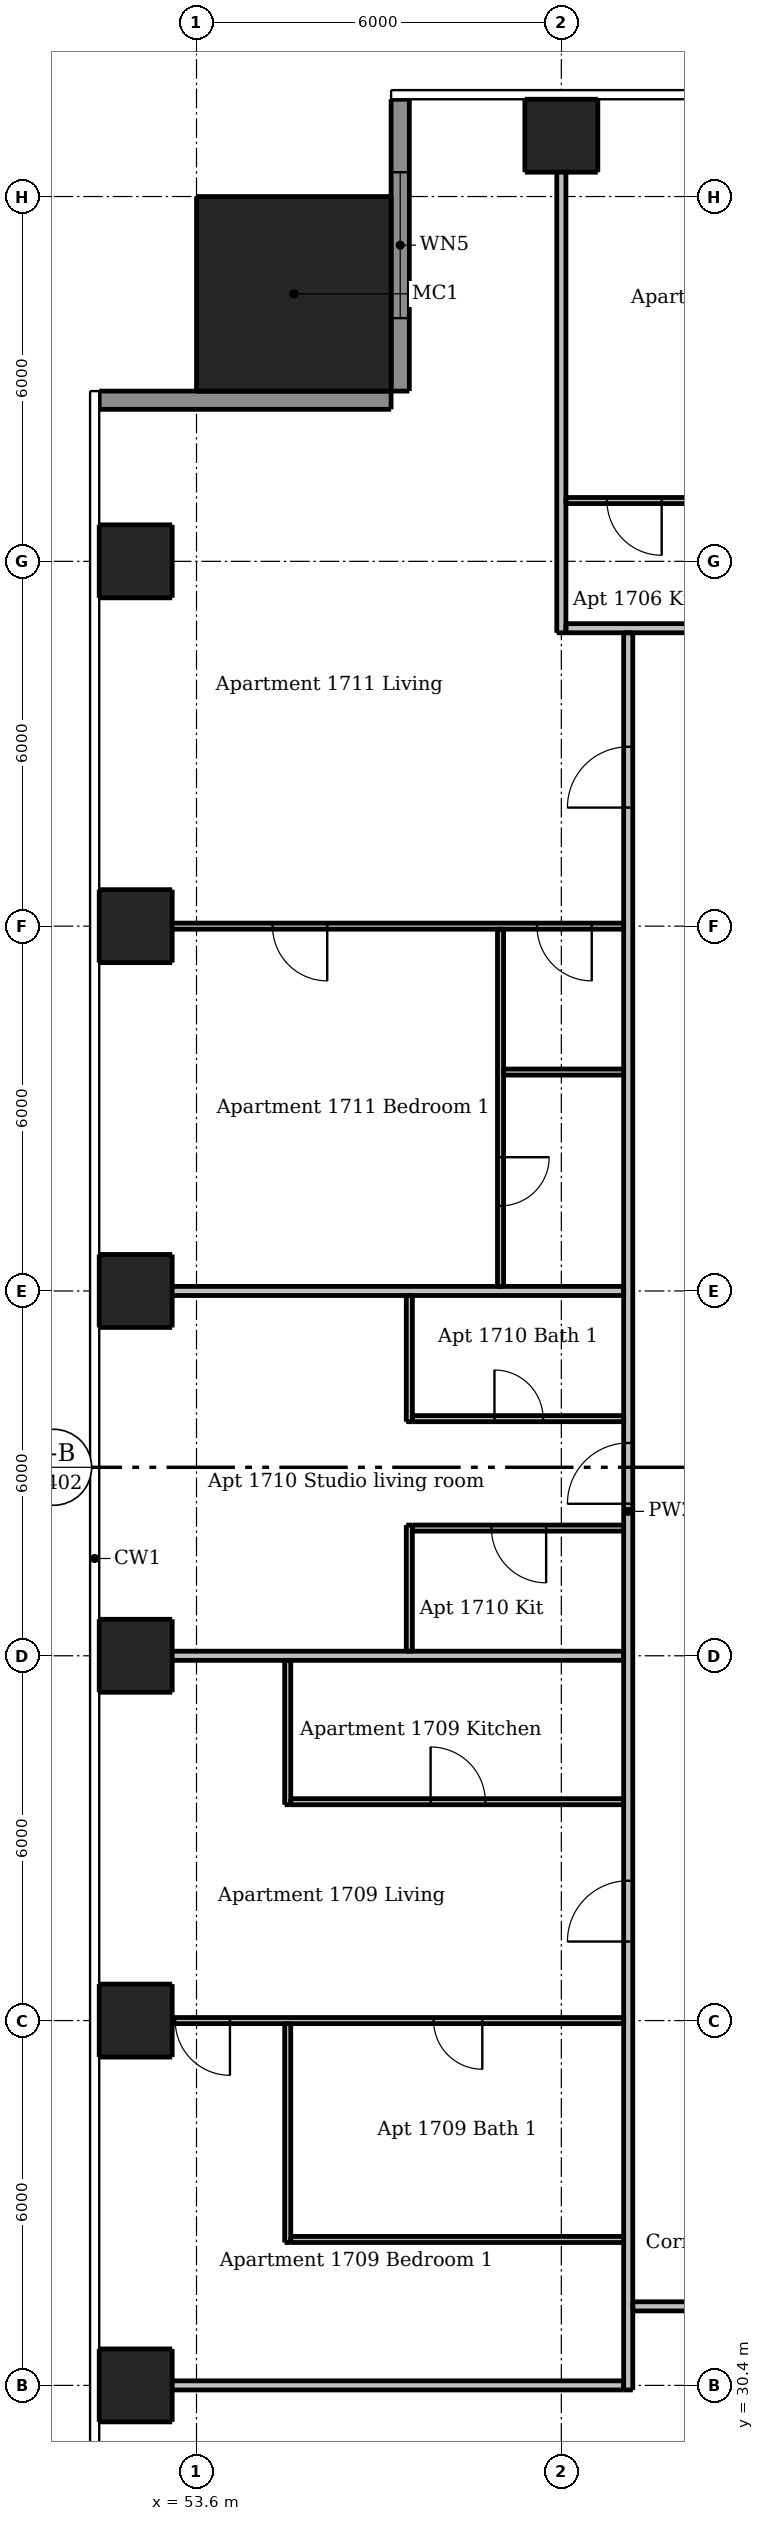
"""IFC4 building model, lengths in metres.
Left out: names, types, materials, properties, quantities, classifications, styles, units other than length and angle.
Written with IfcOpenShell. Run it as: python <this file> out.ifc"""

import sys

from ifc_helpers import new_model, si_unit, direction, frame, frame_2d, origin, origin_2d, place, context, subcontext, project, spatial, rectangle, extrude, element, fill, save


model = new_model("IFC4")
c1 = context("Model", 3, precision=1e-05, world=origin(), true_north=direction((0.0, 1.0)))
c2 = subcontext(c1, "Body", "Model", "MODEL_VIEW")
j1 = project(units=[si_unit("LENGTHUNIT", "METRE"), si_unit("PLANEANGLEUNIT", "RADIAN")], contexts=[c1])
p1 = place(None, origin())
s1 = spatial("IfcSite", under=j1, at=p1, CompositionType="ELEMENT")
p2 = place(p1, origin())
s2 = spatial("IfcBuilding", under=s1, at=p2, CompositionType="ELEMENT")
p3 = place(p2, frame((0.0, 0.0, 63.1)))
s3 = spatial("IfcBuildingStorey", under=s2, at=p3, CompositionType="ELEMENT", Elevation=63.1)
for number, where, z_axis, x_axis in (
    (1, (59.6, 67.4, 0.0), (0.0, 0.0, 1.0), (1.0, 0.0, 0.0)),
    (2, (52.6, 30.4, 0.0), (0.0, 0.0, 1.0), (1.0, 0.0, 0.0)),
    (3, (52.6, 36.4, 0.0), (0.0, 0.0, 1.0), (1.0, 0.0, 0.0)),
    (4, (52.6, 42.4, 0.0), (0.0, 0.0, 1.0), (1.0, 0.0, 0.0)),
    (5, (52.6, 48.4, 0.0), (0.0, 0.0, 1.0), (1.0, 0.0, 0.0)),
    (6, (52.6, 54.4, 0.0), (0.0, 0.0, 1.0), (1.0, 0.0, 0.0)),
    (7, (52.6, 60.4, 0.0), (0.0, 0.0, 1.0), (1.0, 0.0, 0.0)),
):
    element("IfcColumn", number, at=place(p3, frame(where, z_axis=z_axis, x_axis=x_axis)), inside=s3, PredefinedType="COLUMN", context=c2, shape_type="SweptSolid", body=[
        extrude(rectangle(XDim=1.2, YDim=1.2, at=origin_2d()), origin(), (0.0, 0.0, 1.0), 3.05),
    ])
p4 = place(p3, frame((55.2, 64.8, 0.0), z_axis=(0.0, 0.0, 1.0), x_axis=(1.0, 0.0, 0.0)))
e8 = element("IfcColumn", 8, at=p4, inside=s3, PredefinedType="COLUMN", context=c2, shape_type="SweptSolid", body=[
    extrude(rectangle(XDim=3.2, YDim=3.2, at=origin_2d()), origin(), (0.0, 0.0, 1.0), 3.3),
])
p5 = place(p3, frame((56.95, 68.0, 0.0), z_axis=(0.0, 0.0, 1.0), x_axis=(0.0, -1.0, 0.0)))
e9 = element("IfcWall", 9, at=p5, inside=s3, PredefinedType="SOLIDWALL", context=c2, shape_type="SweptSolid", body=[
    extrude(rectangle(XDim=4.8, YDim=0.3, at=frame_2d((2.4, 0.0))), origin(), (0.0, 0.0, 1.0), 3.05),
])
p6 = place(p5, frame((1.2, 0.0, 0.15)))
e10 = element("IfcOpeningElement", 10, at=p6, cuts=e9, PredefinedType="OPENING", context=c2, shape_type="SweptSolid", body=[
    extrude(rectangle(XDim=2.4, YDim=2.1, at=frame_2d((1.2, 1.05))), frame((0.0, 0.16, 0.0), z_axis=(0.0, -1.0, 0.0), x_axis=(1.0, 0.0, 0.0)), (0.0, 0.0, 1.0), 0.32),
])
p7 = place(p3, frame((56.8, 63.05, 0.0), z_axis=(0.0, 0.0, 1.0), x_axis=(-1.0, 0.0, 0.0)))
e11 = element("IfcWall", 11, at=p7, inside=s3, PredefinedType="SOLIDWALL", context=c2, shape_type="SweptSolid", body=[
    extrude(rectangle(XDim=4.8, YDim=0.3, at=frame_2d((2.4, 0.0))), origin(), (0.0, 0.0, 1.0), 3.05),
])
p8 = place(p3, frame((55.1, 32.75, 0.0), z_axis=(0.0, 0.0, 1.0), x_axis=(0.0, 1.0, 0.0)))
e12 = element("IfcWall", 12, at=p8, inside=s3, PredefinedType="PARTITIONING", context=c2, shape_type="SweptSolid", body=[
    extrude(rectangle(XDim=3.6, YDim=0.1, at=frame_2d((1.8, 0.0))), origin(), (0.0, 0.0, 1.0), 3.05),
])
p9 = place(p3, frame((55.1, 39.95, 0.0), z_axis=(0.0, 0.0, 1.0), x_axis=(0.0, 1.0, 0.0)))
e13 = element("IfcWall", 13, at=p9, inside=s3, PredefinedType="PARTITIONING", context=c2, shape_type="SweptSolid", body=[
    extrude(rectangle(XDim=2.375, YDim=0.1, at=frame_2d((1.188, 0.0))), origin(), (0.0, 0.0, 1.0), 3.05),
])
for number, where, z_axis, x_axis in (
    (14, (57.1, 42.475, 0.0), (0.0, 0.0, 1.0), (0.0, 1.0, 0.0)),
    (15, (57.1, 46.25, 0.0), (0.0, 0.0, 1.0), (0.0, 1.0, 0.0)),
):
    element("IfcWall", number, at=place(p3, frame(where, z_axis=z_axis, x_axis=x_axis)), inside=s3, PredefinedType="PARTITIONING", context=c2, shape_type="SweptSolid", body=[
        extrude(rectangle(XDim=2.075, YDim=0.1, at=frame_2d((1.038, 0.0))), origin(), (0.0, 0.0, 1.0), 3.05),
    ])
p10 = place(p3, frame((58.6, 54.35, 0.0), z_axis=(0.0, 0.0, 1.0), x_axis=(0.0, -1.0, 0.0)))
e16 = element("IfcWall", 16, at=p10, inside=s3, PredefinedType="PARTITIONING", context=c2, shape_type="SweptSolid", body=[
    extrude(rectangle(XDim=5.875, YDim=0.1, at=frame_2d((2.938, 0.0))), origin(), (0.0, 0.0, 1.0), 3.05),
])
p11 = place(p10, frame((3.75, 0.0, 0.0)))
e17 = element("IfcOpeningElement", 17, at=p11, cuts=e16, PredefinedType="OPENING", context=c2, shape_type="SweptSolid", body=[
    extrude(rectangle(XDim=0.8, YDim=2.1, at=frame_2d((0.4, 1.05))), frame((0.0, 0.06, 0.0), z_axis=(0.0, -1.0, 0.0), x_axis=(1.0, 0.0, 0.0)), (0.0, 0.0, 1.0), 0.12),
])
p12 = place(p3, frame((61.95, 61.4, 0.0), z_axis=(0.0, 0.0, 1.0), x_axis=(-1.0, 0.0, 0.0)))
e18 = element("IfcWall", 18, at=p12, inside=s3, PredefinedType="PARTITIONING", context=c2, shape_type="SweptSolid", body=[
    extrude(rectangle(XDim=2.275, YDim=0.1, at=frame_2d((1.137, 0.0))), origin(), (0.0, 0.0, 1.0), 3.05),
])
p13 = place(p12, frame((0.7, 0.0, 0.0)))
e19 = element("IfcOpeningElement", 19, at=p13, cuts=e18, PredefinedType="OPENING", context=c2, shape_type="SweptSolid", body=[
    extrude(rectangle(XDim=0.9, YDim=2.1, at=frame_2d((0.45, 1.05))), frame((0.0, 0.06, 0.0), z_axis=(0.0, -1.0, 0.0), x_axis=(1.0, 0.0, 0.0)), (0.0, 0.0, 1.0), 0.12),
])
p14 = place(p3, frame((60.625, 54.4, 0.0), z_axis=(0.0, 0.0, 1.0), x_axis=(-1.0, 0.0, 0.0)))
e20 = element("IfcWall", 20, at=p14, inside=s3, PredefinedType="PARTITIONING", context=c2, shape_type="SweptSolid", body=[
    extrude(rectangle(XDim=8.625, YDim=0.1, at=frame_2d((4.312, 0.0))), origin(), (0.0, 0.0, 1.0), 2.516),
])
p15 = place(p14, frame((0.525, 0.0, 0.0)))
e21 = element("IfcOpeningElement", 21, at=p15, cuts=e20, PredefinedType="OPENING", context=c2, shape_type="SweptSolid", body=[
    extrude(rectangle(XDim=0.9, YDim=2.1, at=frame_2d((0.45, 1.05))), frame((0.0, 0.06, 0.0), z_axis=(0.0, -1.0, 0.0), x_axis=(1.0, 0.0, 0.0)), (0.0, 0.0, 1.0), 0.12),
])
p16 = place(p14, frame((4.875, 0.0, 0.0)))
e22 = element("IfcOpeningElement", 22, at=p16, cuts=e20, PredefinedType="OPENING", context=c2, shape_type="SweptSolid", body=[
    extrude(rectangle(XDim=0.9, YDim=2.1, at=frame_2d((0.45, 1.05))), frame((0.0, 0.06, 0.0), z_axis=(0.0, -1.0, 0.0), x_axis=(1.0, 0.0, 0.0)), (0.0, 0.0, 1.0), 0.12),
])
p17 = place(p3, frame((58.65, 52.0, 0.0), z_axis=(0.0, 0.0, 1.0), x_axis=(1.0, 0.0, 0.0)))
e23 = element("IfcWall", 23, at=p17, inside=s3, PredefinedType="PARTITIONING", context=c2, shape_type="SweptSolid", body=[
    extrude(rectangle(XDim=1.975, YDim=0.1, at=frame_2d((0.988, 0.0))), origin(), (0.0, 0.0, 1.0), 3.05),
])
p18 = place(p3, frame((57.15, 46.3, 0.0), z_axis=(0.0, 0.0, 1.0), x_axis=(1.0, 0.0, 0.0)))
e24 = element("IfcWall", 24, at=p18, inside=s3, PredefinedType="PARTITIONING", context=c2, shape_type="SweptSolid", body=[
    extrude(rectangle(XDim=3.475, YDim=0.1, at=frame_2d((1.738, 0.0))), origin(), (0.0, 0.0, 1.0), 3.05),
])
p19 = place(p18, frame((1.35, 0.0, 0.0)))
e25 = element("IfcOpeningElement", 25, at=p19, cuts=e24, PredefinedType="OPENING", context=c2, shape_type="SweptSolid", body=[
    extrude(rectangle(XDim=0.8, YDim=2.1, at=frame_2d((0.4, 1.05))), frame((0.0, 0.06, 0.0), z_axis=(0.0, -1.0, 0.0), x_axis=(1.0, 0.0, 0.0)), (0.0, 0.0, 1.0), 0.12),
])
p20 = place(p3, frame((60.625, 44.5, 0.0), z_axis=(0.0, 0.0, 1.0), x_axis=(-1.0, 0.0, 0.0)))
e26 = element("IfcWall", 26, at=p20, inside=s3, PredefinedType="PARTITIONING", context=c2, shape_type="SweptSolid", body=[
    extrude(rectangle(XDim=3.475, YDim=0.1, at=frame_2d((1.738, 0.0))), origin(), (0.0, 0.0, 1.0), 3.05),
])
p21 = place(p20, frame((1.275, 0.0, 0.0)))
e27 = element("IfcOpeningElement", 27, at=p21, cuts=e26, PredefinedType="OPENING", context=c2, shape_type="SweptSolid", body=[
    extrude(rectangle(XDim=0.9, YDim=2.1, at=frame_2d((0.45, 1.05))), frame((0.0, 0.06, 0.0), z_axis=(0.0, -1.0, 0.0), x_axis=(1.0, 0.0, 0.0)), (0.0, 0.0, 1.0), 0.12),
])
p22 = place(p3, frame((55.15, 40.0, 0.0), z_axis=(0.0, 0.0, 1.0), x_axis=(1.0, 0.0, 0.0)))
e28 = element("IfcWall", 28, at=p22, inside=s3, PredefinedType="PARTITIONING", context=c2, shape_type="SweptSolid", body=[
    extrude(rectangle(XDim=5.475, YDim=0.1, at=frame_2d((2.738, 0.0))), origin(), (0.0, 0.0, 1.0), 3.05),
])
p23 = place(p22, frame((2.3, 0.0, 0.0)))
e29 = element("IfcOpeningElement", 29, at=p23, cuts=e28, PredefinedType="OPENING", context=c2, shape_type="SweptSolid", body=[
    extrude(rectangle(XDim=0.9, YDim=2.1, at=frame_2d((0.45, 1.05))), frame((0.0, 0.06, 0.0), z_axis=(0.0, -1.0, 0.0), x_axis=(1.0, 0.0, 0.0)), (0.0, 0.0, 1.0), 0.12),
])
p24 = place(p3, frame((60.625, 36.4, 0.0), z_axis=(0.0, 0.0, 1.0), x_axis=(-1.0, 0.0, 0.0)))
e30 = element("IfcWall", 30, at=p24, inside=s3, PredefinedType="PARTITIONING", context=c2, shape_type="SweptSolid", body=[
    extrude(rectangle(XDim=8.625, YDim=0.1, at=frame_2d((4.312, 0.0))), origin(), (0.0, 0.0, 1.0), 2.516),
])
p25 = place(p24, frame((6.475, 0.0, 0.0)))
e31 = element("IfcOpeningElement", 31, at=p25, cuts=e30, PredefinedType="OPENING", context=c2, shape_type="SweptSolid", body=[
    extrude(rectangle(XDim=0.9, YDim=2.1, at=frame_2d((0.45, 1.05))), frame((0.0, 0.06, 0.0), z_axis=(0.0, -1.0, 0.0), x_axis=(1.0, 0.0, 0.0)), (0.0, 0.0, 1.0), 0.12),
])
p26 = place(p24, frame((2.325, 0.0, 0.0)))
e32 = element("IfcOpeningElement", 32, at=p26, cuts=e30, PredefinedType="OPENING", context=c2, shape_type="SweptSolid", body=[
    extrude(rectangle(XDim=0.8, YDim=2.1, at=frame_2d((0.4, 1.05))), frame((0.0, 0.06, 0.0), z_axis=(0.0, -1.0, 0.0), x_axis=(1.0, 0.0, 0.0)), (0.0, 0.0, 1.0), 0.12),
])
p27 = place(p3, frame((55.15, 32.8, 0.0), z_axis=(0.0, 0.0, 1.0), x_axis=(1.0, 0.0, 0.0)))
e33 = element("IfcWall", 33, at=p27, inside=s3, PredefinedType="PARTITIONING", context=c2, shape_type="SweptSolid", body=[
    extrude(rectangle(XDim=5.475, YDim=0.1, at=frame_2d((2.738, 0.0))), origin(), (0.0, 0.0, 1.0), 3.05),
])
p28 = place(p3, frame((59.6, 59.225, 0.0), z_axis=(0.0, 0.0, 1.0), x_axis=(0.0, 1.0, 0.0)))
e34 = element("IfcWall", 34, at=p28, inside=s3, PredefinedType="PARTITIONING", context=c2, shape_type="SweptSolid", body=[
    extrude(rectangle(XDim=8.775, YDim=0.15, at=frame_2d((4.387, 0.0))), origin(), (0.0, 0.0, 1.0), 2.51),
])
p29 = place(p3, frame((60.7, 30.325, 0.0), z_axis=(0.0, 0.0, 1.0), x_axis=(0.0, 1.0, 0.0)))
e35 = element("IfcWall", 35, at=p29, inside=s3, PredefinedType="PARTITIONING", context=c2, shape_type="SweptSolid", body=[
    extrude(rectangle(XDim=28.9, YDim=0.15, at=frame_2d((14.45, 0.0))), origin(), (0.0, 0.0, 1.0), 3.05),
])
p30 = place(p29, frame((7.375, 0.0, 0.0)))
e36 = element("IfcOpeningElement", 36, at=p30, cuts=e35, PredefinedType="OPENING", context=c2, shape_type="SweptSolid", body=[
    extrude(rectangle(XDim=1.0, YDim=2.1, at=frame_2d((0.5, 1.05))), frame((0.0, 0.085, 0.0), z_axis=(0.0, -1.0, 0.0), x_axis=(1.0, 0.0, 0.0)), (0.0, 0.0, 1.0), 0.17),
])
p31 = place(p29, frame((14.575, 0.0, 0.0)))
e37 = element("IfcOpeningElement", 37, at=p31, cuts=e35, PredefinedType="OPENING", context=c2, shape_type="SweptSolid", body=[
    extrude(rectangle(XDim=1.0, YDim=2.1, at=frame_2d((0.5, 1.05))), frame((0.0, 0.085, 0.0), z_axis=(0.0, -1.0, 0.0), x_axis=(1.0, 0.0, 0.0)), (0.0, 0.0, 1.0), 0.17),
])
p32 = place(p29, frame((26.025, 0.0, 0.0)))
e38 = element("IfcOpeningElement", 38, at=p32, cuts=e35, PredefinedType="OPENING", context=c2, shape_type="SweptSolid", body=[
    extrude(rectangle(XDim=1.0, YDim=2.1, at=frame_2d((0.5, 1.05))), frame((0.0, 0.085, 0.0), z_axis=(0.0, -1.0, 0.0), x_axis=(1.0, 0.0, 0.0)), (0.0, 0.0, 1.0), 0.17),
])
p33 = place(p3, frame((59.675, 59.3, 0.0), z_axis=(0.0, 0.0, 1.0), x_axis=(1.0, 0.0, 0.0)))
e39 = element("IfcWall", 39, at=p33, inside=s3, PredefinedType="PARTITIONING", context=c2, shape_type="SweptSolid", body=[
    extrude(rectangle(XDim=28.55, YDim=0.15, at=frame_2d((14.275, 0.0))), origin(), (0.0, 0.0, 1.0), 3.05),
])
p34 = place(p33, frame((3.625, 0.0, 0.0)))
e40 = element("IfcOpeningElement", 40, at=p34, cuts=e39, PredefinedType="OPENING", context=c2, shape_type="SweptSolid", body=[
    extrude(rectangle(XDim=1.0, YDim=2.1, at=frame_2d((0.5, 1.05))), frame((0.0, 0.085, 0.0), z_axis=(0.0, -1.0, 0.0), x_axis=(1.0, 0.0, 0.0)), (0.0, 0.0, 1.0), 0.17),
])
p35 = place(p33, frame((14.425, 0.0, 0.0)))
e41 = element("IfcOpeningElement", 41, at=p35, cuts=e39, PredefinedType="OPENING", context=c2, shape_type="SweptSolid", body=[
    extrude(rectangle(XDim=1.0, YDim=2.1, at=frame_2d((0.5, 1.05))), frame((0.0, 0.085, 0.0), z_axis=(0.0, -1.0, 0.0), x_axis=(1.0, 0.0, 0.0)), (0.0, 0.0, 1.0), 0.17),
])
p36 = place(p33, frame((25.775, 0.0, 0.0)))
e42 = element("IfcOpeningElement", 42, at=p36, cuts=e39, PredefinedType="OPENING", context=c2, shape_type="SweptSolid", body=[
    extrude(rectangle(XDim=1.0, YDim=2.1, at=frame_2d((0.5, 1.05))), frame((0.0, 0.085, 0.0), z_axis=(0.0, -1.0, 0.0), x_axis=(1.0, 0.0, 0.0)), (0.0, 0.0, 1.0), 0.17),
])
for number, where, z_axis, x_axis in (
    (43, (52.0, 48.4, 0.0), (0.0, 0.0, 1.0), (1.0, 0.0, 0.0)),
    (44, (52.0, 42.4, 0.0), (0.0, 0.0, 1.0), (1.0, 0.0, 0.0)),
):
    element("IfcWall", number, at=place(p3, frame(where, z_axis=z_axis, x_axis=x_axis)), inside=s3, PredefinedType="PARTITIONING", context=c2, shape_type="SweptSolid", body=[
        extrude(rectangle(XDim=8.625, YDim=0.15, at=frame_2d((4.312, 0.0))), origin(), (0.0, 0.0, 1.0), 2.516),
    ])
p37 = place(p3, frame((89.525, 31.7, 0.0), z_axis=(0.0, 0.0, 1.0), x_axis=(-1.0, 0.0, 0.0)))
e45 = element("IfcWall", 45, at=p37, inside=s3, PredefinedType="PARTITIONING", context=c2, shape_type="SweptSolid", body=[
    extrude(rectangle(XDim=28.75, YDim=0.15, at=frame_2d((14.375, 0.0))), origin(), (0.0, 0.0, 1.0), 3.05),
])
p38 = place(p37, frame((24.625, 0.0, 0.0)))
e46 = element("IfcOpeningElement", 46, at=p38, cuts=e45, PredefinedType="OPENING", context=c2, shape_type="SweptSolid", body=[
    extrude(rectangle(XDim=1.0, YDim=2.1, at=frame_2d((0.5, 1.05))), frame((0.0, 0.085, 0.0), z_axis=(0.0, -1.0, 0.0), x_axis=(1.0, 0.0, 0.0)), (0.0, 0.0, 1.0), 0.17),
])
p39 = place(p37, frame((8.425, 0.0, 0.0)))
e47 = element("IfcOpeningElement", 47, at=p39, cuts=e45, PredefinedType="OPENING", context=c2, shape_type="SweptSolid", body=[
    extrude(rectangle(XDim=1.0, YDim=2.1, at=frame_2d((0.5, 1.05))), frame((0.0, 0.085, 0.0), z_axis=(0.0, -1.0, 0.0), x_axis=(1.0, 0.0, 0.0)), (0.0, 0.0, 1.0), 0.17),
])
p40 = place(p3, frame((52.0, 30.4, 0.0), z_axis=(0.0, 0.0, 1.0), x_axis=(1.0, 0.0, 0.0)))
e48 = element("IfcWall", 48, at=p40, inside=s3, PredefinedType="PARTITIONING", context=c2, shape_type="SweptSolid", body=[
    extrude(rectangle(XDim=8.625, YDim=0.15, at=frame_2d((4.312, 0.0))), origin(), (0.0, 0.0, 1.0), 2.647),
])
p41 = place(p6, origin())
e49 = element("IfcWindow", 49, at=p41, inside=s3, PartitioningType="DOUBLE_PANEL_VERTICAL", PredefinedType="WINDOW", context=c2, shape_type="SweptSolid", body=[
    extrude(rectangle(XDim=2.4, YDim=2.1, at=frame_2d((1.2, 1.05))), frame((0.0, 0.03, 0.0), z_axis=(0.0, -1.0, 0.0), x_axis=(1.0, 0.0, 0.0)), (0.0, 0.0, 1.0), 0.06),
])
fill(e10, e49)
p42 = place(p13, origin())
e50 = element("IfcDoor", 50, at=p42, inside=s3, OperationType="SINGLE_SWING_LEFT", PredefinedType="DOOR", context=c2, shape_type="SweptSolid", body=[
    extrude(rectangle(XDim=0.9, YDim=2.1, at=frame_2d((0.45, 1.05))), frame((0.0, 0.025, 0.0), z_axis=(0.0, -1.0, 0.0), x_axis=(1.0, 0.0, 0.0)), (0.0, 0.0, 1.0), 0.05),
])
fill(e19, e50)
p43 = place(p30, origin())
e51 = element("IfcDoor", 51, at=p43, inside=s3, OperationType="SINGLE_SWING_LEFT", PredefinedType="DOOR", context=c2, shape_type="SweptSolid", body=[
    extrude(rectangle(XDim=1.0, YDim=2.1, at=frame_2d((0.5, 1.05))), frame((0.0, 0.025, 0.0), z_axis=(0.0, -1.0, 0.0), x_axis=(1.0, 0.0, 0.0)), (0.0, 0.0, 1.0), 0.05),
])
fill(e36, e51)
p44 = place(p23, origin())
e52 = element("IfcDoor", 52, at=p44, inside=s3, OperationType="SINGLE_SWING_LEFT", PredefinedType="DOOR", context=c2, shape_type="SweptSolid", body=[
    extrude(rectangle(XDim=0.9, YDim=2.1, at=frame_2d((0.45, 1.05))), frame((0.0, 0.025, 0.0), z_axis=(0.0, -1.0, 0.0), x_axis=(1.0, 0.0, 0.0)), (0.0, 0.0, 1.0), 0.05),
])
fill(e29, e52)
p45 = place(p25, origin())
e53 = element("IfcDoor", 53, at=p45, inside=s3, OperationType="SINGLE_SWING_LEFT", PredefinedType="DOOR", context=c2, shape_type="SweptSolid", body=[
    extrude(rectangle(XDim=0.9, YDim=2.1, at=frame_2d((0.45, 1.05))), frame((0.0, 0.025, 0.0), z_axis=(0.0, -1.0, 0.0), x_axis=(1.0, 0.0, 0.0)), (0.0, 0.0, 1.0), 0.05),
])
fill(e31, e53)
p46 = place(p26, origin())
e54 = element("IfcDoor", 54, at=p46, inside=s3, OperationType="SINGLE_SWING_LEFT", PredefinedType="DOOR", context=c2, shape_type="SweptSolid", body=[
    extrude(rectangle(XDim=0.8, YDim=2.1, at=frame_2d((0.4, 1.05))), frame((0.0, 0.025, 0.0), z_axis=(0.0, -1.0, 0.0), x_axis=(1.0, 0.0, 0.0)), (0.0, 0.0, 1.0), 0.05),
])
fill(e32, e54)
p47 = place(p31, origin())
e55 = element("IfcDoor", 55, at=p47, inside=s3, OperationType="SINGLE_SWING_LEFT", PredefinedType="DOOR", context=c2, shape_type="SweptSolid", body=[
    extrude(rectangle(XDim=1.0, YDim=2.1, at=frame_2d((0.5, 1.05))), frame((0.0, 0.025, 0.0), z_axis=(0.0, -1.0, 0.0), x_axis=(1.0, 0.0, 0.0)), (0.0, 0.0, 1.0), 0.05),
])
fill(e37, e55)
p48 = place(p21, origin())
e56 = element("IfcDoor", 56, at=p48, inside=s3, OperationType="SINGLE_SWING_LEFT", PredefinedType="DOOR", context=c2, shape_type="SweptSolid", body=[
    extrude(rectangle(XDim=0.9, YDim=2.1, at=frame_2d((0.45, 1.05))), frame((0.0, 0.025, 0.0), z_axis=(0.0, -1.0, 0.0), x_axis=(1.0, 0.0, 0.0)), (0.0, 0.0, 1.0), 0.05),
])
fill(e27, e56)
p49 = place(p19, origin())
e57 = element("IfcDoor", 57, at=p49, inside=s3, OperationType="SINGLE_SWING_LEFT", PredefinedType="DOOR", context=c2, shape_type="SweptSolid", body=[
    extrude(rectangle(XDim=0.8, YDim=2.1, at=frame_2d((0.4, 1.05))), frame((0.0, 0.025, 0.0), z_axis=(0.0, -1.0, 0.0), x_axis=(1.0, 0.0, 0.0)), (0.0, 0.0, 1.0), 0.05),
])
fill(e25, e57)
p50 = place(p32, origin())
e58 = element("IfcDoor", 58, at=p50, inside=s3, OperationType="SINGLE_SWING_LEFT", PredefinedType="DOOR", context=c2, shape_type="SweptSolid", body=[
    extrude(rectangle(XDim=1.0, YDim=2.1, at=frame_2d((0.5, 1.05))), frame((0.0, 0.025, 0.0), z_axis=(0.0, -1.0, 0.0), x_axis=(1.0, 0.0, 0.0)), (0.0, 0.0, 1.0), 0.05),
])
fill(e38, e58)
p51 = place(p15, origin())
e59 = element("IfcDoor", 59, at=p51, inside=s3, OperationType="SINGLE_SWING_LEFT", PredefinedType="DOOR", context=c2, shape_type="SweptSolid", body=[
    extrude(rectangle(XDim=0.9, YDim=2.1, at=frame_2d((0.45, 1.05))), frame((0.0, 0.025, 0.0), z_axis=(0.0, -1.0, 0.0), x_axis=(1.0, 0.0, 0.0)), (0.0, 0.0, 1.0), 0.05),
])
fill(e21, e59)
p52 = place(p16, origin())
e60 = element("IfcDoor", 60, at=p52, inside=s3, OperationType="SINGLE_SWING_LEFT", PredefinedType="DOOR", context=c2, shape_type="SweptSolid", body=[
    extrude(rectangle(XDim=0.9, YDim=2.1, at=frame_2d((0.45, 1.05))), frame((0.0, 0.025, 0.0), z_axis=(0.0, -1.0, 0.0), x_axis=(1.0, 0.0, 0.0)), (0.0, 0.0, 1.0), 0.05),
])
fill(e22, e60)
p53 = place(p11, origin())
e61 = element("IfcDoor", 61, at=p53, inside=s3, OperationType="SINGLE_SWING_LEFT", PredefinedType="DOOR", context=c2, shape_type="SweptSolid", body=[
    extrude(rectangle(XDim=0.8, YDim=2.1, at=frame_2d((0.4, 1.05))), frame((0.0, 0.025, 0.0), z_axis=(0.0, -1.0, 0.0), x_axis=(1.0, 0.0, 0.0)), (0.0, 0.0, 1.0), 0.05),
])
fill(e17, e61)
save(model, sys.argv[1])
